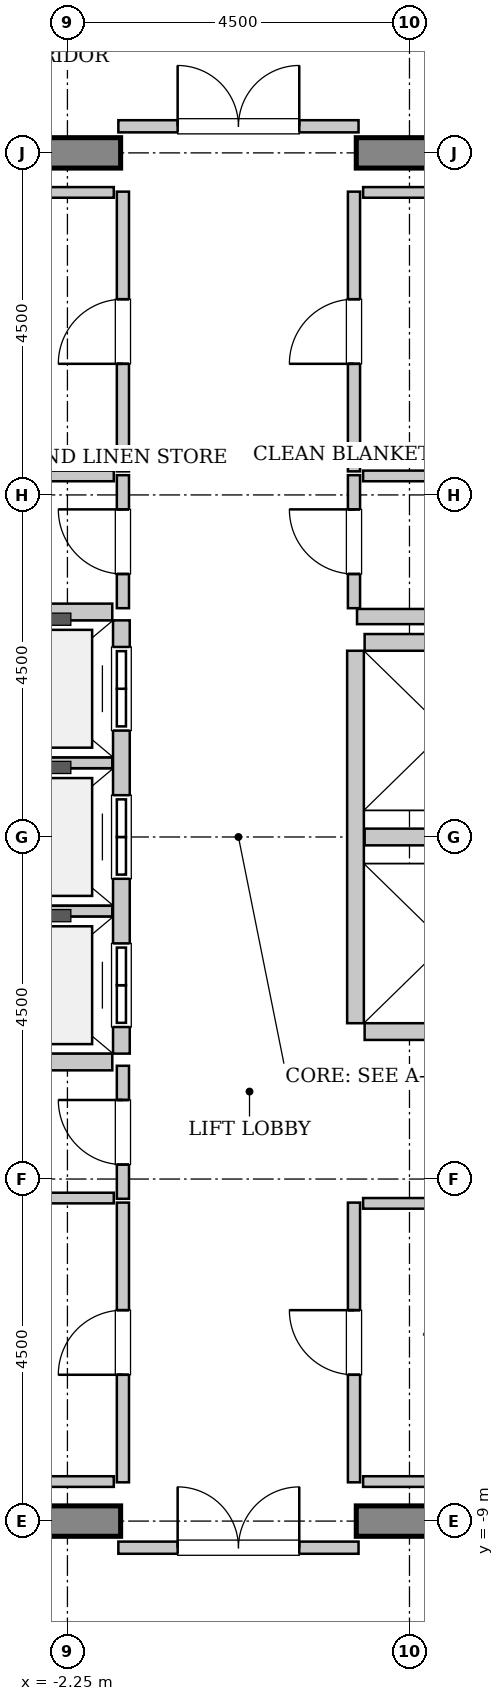
"""IFC4 building model, lengths in metres.
Left out: names, types, materials, properties, quantities, classifications, styles, units other than length and angle.
Written with IfcOpenShell. Run it as: python <this file> out.ifc"""

import sys

from ifc_helpers import new_model, si_unit, direction, frame, frame_2d, origin, place, context, subcontext, project, spatial, rectangle, extrude, source, transform, mapped, element, fill, save


model = new_model("IFC4")
c1 = context("Model", 3, precision=1e-05, world=origin(), true_north=direction((0.0, 1.0)))
c2 = subcontext(c1, "Body", "Model", "MODEL_VIEW")
j1 = project(units=[si_unit("LENGTHUNIT", "METRE"), si_unit("PLANEANGLEUNIT", "RADIAN")], contexts=[c1])
p1 = place(None, origin())
s1 = spatial("IfcSite", under=j1, at=p1, CompositionType="ELEMENT")
p2 = place(p1, origin())
s2 = spatial("IfcBuilding", under=s1, at=p2, CompositionType="ELEMENT")
p3 = place(p2, frame((0.0, 0.0, 345.2)))
s3 = spatial("IfcBuildingStorey", under=s2, at=p3, CompositionType="ELEMENT", Elevation=345.2)
m1 = source(origin(), c2, "Body", "SweptSolid", [
    extrude(rectangle(XDim=9.9, YDim=0.4, at=frame_2d((4.95, 0.0))), origin(), (0.0, 0.0, 1.0), 3.8),
])
for number, where, z_axis, x_axis in (
    (1, (-11.45, 9.0, 0.0), (0.0, 0.0, 1.0), (1.0, 0.0, 0.0)),
    (2, (1.55, 9.0, 0.0), (0.0, 0.0, 1.0), (1.0, 0.0, 0.0)),
    (3, (-11.45, -9.0, 0.0), (0.0, 0.0, 1.0), (1.0, 0.0, 0.0)),
    (4, (1.55, -9.0, 0.0), (0.0, 0.0, 1.0), (1.0, 0.0, 0.0)),
):
    element("IfcWall", number, at=place(p3, frame(where, z_axis=z_axis, x_axis=x_axis)), inside=s3, PredefinedType="SHEAR", context=c2, shape_type="MappedRepresentation", body=[
        mapped(m1, transform((0.0, 0.0, 0.0), x_axis=(1.0, 0.0, 0.0), y_axis=(0.0, 1.0, 0.0), z_axis=(0.0, 0.0, 1.0), scale=1.0)),
    ])
m2 = source(origin(), c2, "Body", "SweptSolid", [
    extrude(rectangle(XDim=5.7, YDim=0.22, at=frame_2d((2.85, 0.0))), origin(), (0.0, 0.0, 1.0), 3.485),
])
p4 = place(p3, frame((-1.54, -2.85, 0.0), z_axis=(0.0, 0.0, 1.0), x_axis=(0.0, 1.0, 0.0)))
e5 = element("IfcWall", 5, at=p4, inside=s3, PredefinedType="SOLIDWALL", context=c2, shape_type="MappedRepresentation", body=[
    mapped(m2, transform((0.0, 0.0, 0.0), x_axis=(1.0, 0.0, 0.0), y_axis=(0.0, 1.0, 0.0), z_axis=(0.0, 0.0, 1.0), scale=1.0)),
])
p5 = place(p4, frame((0.35, 0.0, 0.0)))
e6 = element("IfcOpeningElement", 6, at=p5, cuts=e5, PredefinedType="OPENING", context=c2, shape_type="SweptSolid", body=[
    extrude(rectangle(XDim=1.1, YDim=2.2, at=frame_2d((0.55, 1.1))), frame((0.0, 0.12, 0.0), z_axis=(0.0, -1.0, 0.0), x_axis=(1.0, 0.0, 0.0)), (0.0, 0.0, 1.0), 0.24),
])
p6 = place(p4, frame((2.3, 0.0, 0.0)))
e7 = element("IfcOpeningElement", 7, at=p6, cuts=e5, PredefinedType="OPENING", context=c2, shape_type="SweptSolid", body=[
    extrude(rectangle(XDim=1.1, YDim=2.2, at=frame_2d((0.55, 1.1))), frame((0.0, 0.12, 0.0), z_axis=(0.0, -1.0, 0.0), x_axis=(1.0, 0.0, 0.0)), (0.0, 0.0, 1.0), 0.24),
])
p7 = place(p4, frame((4.25, 0.0, 0.0)))
e8 = element("IfcOpeningElement", 8, at=p7, cuts=e5, PredefinedType="OPENING", context=c2, shape_type="SweptSolid", body=[
    extrude(rectangle(XDim=1.1, YDim=2.2, at=frame_2d((0.55, 1.1))), frame((0.0, 0.12, 0.0), z_axis=(0.0, -1.0, 0.0), x_axis=(1.0, 0.0, 0.0)), (0.0, 0.0, 1.0), 0.24),
])
m3 = source(origin(), c2, "Body", "SweptSolid", [
    extrude(rectangle(XDim=2.13, YDim=0.22, at=frame_2d((1.065, 0.0))), origin(), (0.0, 0.0, 1.0), 3.485),
])
p8 = place(p3, frame((-3.79, -2.96, 0.0), z_axis=(0.0, 0.0, 1.0), x_axis=(1.0, 0.0, 0.0)))
e9 = element("IfcWall", 9, at=p8, inside=s3, PredefinedType="SOLIDWALL", context=c2, shape_type="MappedRepresentation", body=[
    mapped(m3, transform((0.0, 0.0, 0.0), x_axis=(1.0, 0.0, 0.0), y_axis=(0.0, 1.0, 0.0), z_axis=(0.0, 0.0, 1.0), scale=1.0)),
])
m4 = source(origin(), c2, "Body", "SweptSolid", [
    extrude(rectangle(XDim=2.13, YDim=0.14, at=frame_2d((1.065, 0.0))), origin(), (0.0, 0.0, 1.0), 3.485),
])
for number, where, z_axis, x_axis in (
    (10, (-3.79, -0.975, 0.0), (0.0, 0.0, 1.0), (1.0, 0.0, 0.0)),
    (11, (-3.79, 0.975, 0.0), (0.0, 0.0, 1.0), (1.0, 0.0, 0.0)),
):
    element("IfcWall", number, at=place(p3, frame(where, z_axis=z_axis, x_axis=x_axis)), inside=s3, PredefinedType="PARTITIONING", context=c2, shape_type="MappedRepresentation", body=[
        mapped(m4, transform((0.0, 0.0, 0.0), x_axis=(1.0, 0.0, 0.0), y_axis=(0.0, 1.0, 0.0), z_axis=(0.0, 0.0, 1.0), scale=1.0)),
    ])
p9 = place(p3, frame((-1.66, 2.96, 0.0), z_axis=(0.0, 0.0, 1.0), x_axis=(-1.0, 0.0, 0.0)))
e12 = element("IfcWall", 12, at=p9, inside=s3, PredefinedType="SOLIDWALL", context=c2, shape_type="MappedRepresentation", body=[
    mapped(m3, transform((0.0, 0.0, 0.0), x_axis=(1.0, 0.0, 0.0), y_axis=(0.0, 1.0, 0.0), z_axis=(0.0, 0.0, 1.0), scale=1.0)),
])
m5 = source(origin(), c2, "Body", "SweptSolid", [
    extrude(rectangle(XDim=4.9, YDim=0.22, at=frame_2d((2.45, 0.0))), origin(), (0.0, 0.0, 1.0), 3.485),
])
p10 = place(p3, frame((1.54, 2.45, 0.0), z_axis=(0.0, 0.0, 1.0), x_axis=(0.0, -1.0, 0.0)))
e13 = element("IfcWall", 13, at=p10, inside=s3, PredefinedType="SOLIDWALL", context=c2, shape_type="MappedRepresentation", body=[
    mapped(m5, transform((0.0, 0.0, 0.0), x_axis=(1.0, 0.0, 0.0), y_axis=(0.0, 1.0, 0.0), z_axis=(0.0, 0.0, 1.0), scale=1.0)),
])
for number, where, z_axis, x_axis in (
    (14, (1.66, -2.56, 0.0), (0.0, 0.0, 1.0), (1.0, 0.0, 0.0)),
    (15, (1.66, 0.0, 0.0), (0.0, 0.0, 1.0), (1.0, 0.0, 0.0)),
    (16, (3.79, 2.56, 0.0), (0.0, 0.0, 1.0), (-1.0, 0.0, 0.0)),
):
    element("IfcWall", number, at=place(p3, frame(where, z_axis=z_axis, x_axis=x_axis)), inside=s3, PredefinedType="SOLIDWALL", context=c2, shape_type="MappedRepresentation", body=[
        mapped(m3, transform((0.0, 0.0, 0.0), x_axis=(1.0, 0.0, 0.0), y_axis=(0.0, 1.0, 0.0), z_axis=(0.0, 0.0, 1.0), scale=1.0)),
    ])
m6 = source(origin(), c2, "Body", "SweptSolid", [
    extrude(rectangle(XDim=2.52, YDim=0.2, at=frame_2d((1.26, 0.0))), origin(), (0.0, 0.0, 1.0), 3.485),
])
p11 = place(p3, frame((1.56, 2.9, 0.0), z_axis=(0.0, 0.0, 1.0), x_axis=(1.0, 0.0, 0.0)))
e17 = element("IfcWall", 17, at=p11, inside=s3, PredefinedType="PARTITIONING", context=c2, shape_type="MappedRepresentation", body=[
    mapped(m6, transform((0.0, 0.0, 0.0), x_axis=(1.0, 0.0, 0.0), y_axis=(0.0, 1.0, 0.0), z_axis=(0.0, 0.0, 1.0), scale=1.0)),
])
m7 = source(origin(), c2, "Body", "SweptSolid", [
    extrude(rectangle(XDim=3.16, YDim=0.16, at=frame_2d((1.58, 0.0))), origin(), (0.0, 0.0, 1.0), 2.575),
])
p12 = place(p3, frame((-1.58, 9.35, 0.0), z_axis=(0.0, 0.0, 1.0), x_axis=(1.0, 0.0, 0.0)))
e18 = element("IfcWall", 18, at=p12, inside=s3, PredefinedType="PARTITIONING", context=c2, shape_type="MappedRepresentation", body=[
    mapped(m7, transform((0.0, 0.0, 0.0), x_axis=(1.0, 0.0, 0.0), y_axis=(0.0, 1.0, 0.0), z_axis=(0.0, 0.0, 1.0), scale=1.0)),
])
p13 = place(p12, frame((0.78, 0.0, 0.0)))
e19 = element("IfcOpeningElement", 19, at=p13, cuts=e18, PredefinedType="OPENING", context=c2, shape_type="SweptSolid", body=[
    extrude(rectangle(XDim=1.6, YDim=2.3, at=frame_2d((0.8, 1.15))), frame((0.0, 0.09, 0.0), z_axis=(0.0, -1.0, 0.0), x_axis=(1.0, 0.0, 0.0)), (0.0, 0.0, 1.0), 0.18),
])
p14 = place(p3, frame((-1.58, -9.35, 0.0), z_axis=(0.0, 0.0, 1.0), x_axis=(1.0, 0.0, 0.0)))
e20 = element("IfcWall", 20, at=p14, inside=s3, PredefinedType="PARTITIONING", context=c2, shape_type="MappedRepresentation", body=[
    mapped(m7, transform((0.0, 0.0, 0.0), x_axis=(1.0, 0.0, 0.0), y_axis=(0.0, 1.0, 0.0), z_axis=(0.0, 0.0, 1.0), scale=1.0)),
])
p15 = place(p14, frame((0.78, 0.0, 0.0)))
e21 = element("IfcOpeningElement", 21, at=p15, cuts=e20, PredefinedType="OPENING", context=c2, shape_type="SweptSolid", body=[
    extrude(rectangle(XDim=1.6, YDim=2.3, at=frame_2d((0.8, 1.15))), frame((0.0, 0.09, 0.0), z_axis=(0.0, -1.0, 0.0), x_axis=(1.0, 0.0, 0.0)), (0.0, 0.0, 1.0), 0.18),
])
m8 = source(origin(), c2, "Body", "SweptSolid", [
    extrude(rectangle(XDim=1.75, YDim=0.16, at=frame_2d((0.875, 0.0))), origin(), (0.0, 0.0, 1.0), 3.485),
])
p16 = place(p3, frame((-1.52, 3.01, 0.0), z_axis=(0.0, 0.0, 1.0), x_axis=(0.0, 1.0, 0.0)))
e22 = element("IfcWall", 22, at=p16, inside=s3, PredefinedType="PARTITIONING", context=c2, shape_type="MappedRepresentation", body=[
    mapped(m8, transform((0.0, 0.0, 0.0), x_axis=(1.0, 0.0, 0.0), y_axis=(0.0, 1.0, 0.0), z_axis=(0.0, 0.0, 1.0), scale=1.0)),
])
p17 = place(p16, frame((0.45, 0.0, 0.0)))
e23 = element("IfcOpeningElement", 23, at=p17, cuts=e22, PredefinedType="OPENING", context=c2, shape_type="SweptSolid", body=[
    extrude(rectangle(XDim=0.85, YDim=2.1, at=frame_2d((0.425, 1.05))), frame((0.0, 0.09, 0.0), z_axis=(0.0, -1.0, 0.0), x_axis=(1.0, 0.0, 0.0)), (0.0, 0.0, 1.0), 0.18),
])
m9 = source(origin(), c2, "Body", "SweptSolid", [
    extrude(rectangle(XDim=2.95, YDim=0.14, at=frame_2d((1.475, 0.0))), origin(), (0.0, 0.0, 1.0), 3.485),
])
p18 = place(p3, frame((-4.59, 4.75, 0.0), z_axis=(0.0, 0.0, 1.0), x_axis=(1.0, 0.0, 0.0)))
e24 = element("IfcWall", 24, at=p18, inside=s3, PredefinedType="PARTITIONING", context=c2, shape_type="MappedRepresentation", body=[
    mapped(m9, transform((0.0, 0.0, 0.0), x_axis=(1.0, 0.0, 0.0), y_axis=(0.0, 1.0, 0.0), z_axis=(0.0, 0.0, 1.0), scale=1.0)),
])
m10 = source(origin(), c2, "Body", "SweptSolid", [
    extrude(rectangle(XDim=3.68, YDim=0.16, at=frame_2d((1.84, 0.0))), origin(), (0.0, 0.0, 1.0), 3.485),
])
p19 = place(p3, frame((-1.52, 4.81, 0.0), z_axis=(0.0, 0.0, 1.0), x_axis=(0.0, 1.0, 0.0)))
e25 = element("IfcWall", 25, at=p19, inside=s3, PredefinedType="PARTITIONING", context=c2, shape_type="MappedRepresentation", body=[
    mapped(m10, transform((0.0, 0.0, 0.0), x_axis=(1.0, 0.0, 0.0), y_axis=(0.0, 1.0, 0.0), z_axis=(0.0, 0.0, 1.0), scale=1.0)),
])
p20 = place(p19, frame((1.415, 0.0, 0.0)))
e26 = element("IfcOpeningElement", 26, at=p20, cuts=e25, PredefinedType="OPENING", context=c2, shape_type="SweptSolid", body=[
    extrude(rectangle(XDim=0.85, YDim=2.1, at=frame_2d((0.425, 1.05))), frame((0.0, 0.09, 0.0), z_axis=(0.0, -1.0, 0.0), x_axis=(1.0, 0.0, 0.0)), (0.0, 0.0, 1.0), 0.18),
])
m11 = source(origin(), c2, "Body", "SweptSolid", [
    extrude(rectangle(XDim=3.15, YDim=0.14, at=frame_2d((1.575, 0.0))), origin(), (0.0, 0.0, 1.0), 3.485),
])
p21 = place(p3, frame((-4.79, 8.48, 0.0), z_axis=(0.0, 0.0, 1.0), x_axis=(1.0, 0.0, 0.0)))
e27 = element("IfcWall", 27, at=p21, inside=s3, PredefinedType="PARTITIONING", context=c2, shape_type="MappedRepresentation", body=[
    mapped(m11, transform((0.0, 0.0, 0.0), x_axis=(1.0, 0.0, 0.0), y_axis=(0.0, 1.0, 0.0), z_axis=(0.0, 0.0, 1.0), scale=1.0)),
])
p22 = place(p3, frame((1.52, 3.01, 0.0), z_axis=(0.0, 0.0, 1.0), x_axis=(0.0, 1.0, 0.0)))
e28 = element("IfcWall", 28, at=p22, inside=s3, PredefinedType="PARTITIONING", context=c2, shape_type="MappedRepresentation", body=[
    mapped(m8, transform((0.0, 0.0, 0.0), x_axis=(1.0, 0.0, 0.0), y_axis=(0.0, 1.0, 0.0), z_axis=(0.0, 0.0, 1.0), scale=1.0)),
])
p23 = place(p22, frame((0.45, 0.0, 0.0)))
e29 = element("IfcOpeningElement", 29, at=p23, cuts=e28, PredefinedType="OPENING", context=c2, shape_type="SweptSolid", body=[
    extrude(rectangle(XDim=0.85, YDim=2.1, at=frame_2d((0.425, 1.05))), frame((0.0, 0.09, 0.0), z_axis=(0.0, -1.0, 0.0), x_axis=(1.0, 0.0, 0.0)), (0.0, 0.0, 1.0), 0.18),
])
p24 = place(p3, frame((1.64, 4.75, 0.0), z_axis=(0.0, 0.0, 1.0), x_axis=(1.0, 0.0, 0.0)))
e30 = element("IfcWall", 30, at=p24, inside=s3, PredefinedType="PARTITIONING", context=c2, shape_type="MappedRepresentation", body=[
    mapped(m11, transform((0.0, 0.0, 0.0), x_axis=(1.0, 0.0, 0.0), y_axis=(0.0, 1.0, 0.0), z_axis=(0.0, 0.0, 1.0), scale=1.0)),
])
p25 = place(p3, frame((1.52, 4.81, 0.0), z_axis=(0.0, 0.0, 1.0), x_axis=(0.0, 1.0, 0.0)))
e31 = element("IfcWall", 31, at=p25, inside=s3, PredefinedType="PARTITIONING", context=c2, shape_type="MappedRepresentation", body=[
    mapped(m10, transform((0.0, 0.0, 0.0), x_axis=(1.0, 0.0, 0.0), y_axis=(0.0, 1.0, 0.0), z_axis=(0.0, 0.0, 1.0), scale=1.0)),
])
p26 = place(p25, frame((1.415, 0.0, 0.0)))
e32 = element("IfcOpeningElement", 32, at=p26, cuts=e31, PredefinedType="OPENING", context=c2, shape_type="SweptSolid", body=[
    extrude(rectangle(XDim=0.85, YDim=2.1, at=frame_2d((0.425, 1.05))), frame((0.0, 0.09, 0.0), z_axis=(0.0, -1.0, 0.0), x_axis=(1.0, 0.0, 0.0)), (0.0, 0.0, 1.0), 0.18),
])
p27 = place(p3, frame((1.64, 8.48, 0.0), z_axis=(0.0, 0.0, 1.0), x_axis=(1.0, 0.0, 0.0)))
e33 = element("IfcWall", 33, at=p27, inside=s3, PredefinedType="PARTITIONING", context=c2, shape_type="MappedRepresentation", body=[
    mapped(m11, transform((0.0, 0.0, 0.0), x_axis=(1.0, 0.0, 0.0), y_axis=(0.0, 1.0, 0.0), z_axis=(0.0, 0.0, 1.0), scale=1.0)),
])
p28 = place(p3, frame((-1.52, -4.76, 0.0), z_axis=(0.0, 0.0, 1.0), x_axis=(0.0, 1.0, 0.0)))
e34 = element("IfcWall", 34, at=p28, inside=s3, PredefinedType="PARTITIONING", context=c2, shape_type="MappedRepresentation", body=[
    mapped(m8, transform((0.0, 0.0, 0.0), x_axis=(1.0, 0.0, 0.0), y_axis=(0.0, 1.0, 0.0), z_axis=(0.0, 0.0, 1.0), scale=1.0)),
])
p29 = place(p28, frame((0.45, 0.0, 0.0)))
e35 = element("IfcOpeningElement", 35, at=p29, cuts=e34, PredefinedType="OPENING", context=c2, shape_type="SweptSolid", body=[
    extrude(rectangle(XDim=0.85, YDim=2.1, at=frame_2d((0.425, 1.05))), frame((0.0, 0.09, 0.0), z_axis=(0.0, -1.0, 0.0), x_axis=(1.0, 0.0, 0.0)), (0.0, 0.0, 1.0), 0.18),
])
p30 = place(p3, frame((-4.79, -4.75, 0.0), z_axis=(0.0, 0.0, 1.0), x_axis=(1.0, 0.0, 0.0)))
e36 = element("IfcWall", 36, at=p30, inside=s3, PredefinedType="PARTITIONING", context=c2, shape_type="MappedRepresentation", body=[
    mapped(m11, transform((0.0, 0.0, 0.0), x_axis=(1.0, 0.0, 0.0), y_axis=(0.0, 1.0, 0.0), z_axis=(0.0, 0.0, 1.0), scale=1.0)),
])
p31 = place(p3, frame((-1.52, -8.49, 0.0), z_axis=(0.0, 0.0, 1.0), x_axis=(0.0, 1.0, 0.0)))
e37 = element("IfcWall", 37, at=p31, inside=s3, PredefinedType="PARTITIONING", context=c2, shape_type="MappedRepresentation", body=[
    mapped(m10, transform((0.0, 0.0, 0.0), x_axis=(1.0, 0.0, 0.0), y_axis=(0.0, 1.0, 0.0), z_axis=(0.0, 0.0, 1.0), scale=1.0)),
])
p32 = place(p31, frame((1.415, 0.0, 0.0)))
e38 = element("IfcOpeningElement", 38, at=p32, cuts=e37, PredefinedType="OPENING", context=c2, shape_type="SweptSolid", body=[
    extrude(rectangle(XDim=0.85, YDim=2.1, at=frame_2d((0.425, 1.05))), frame((0.0, 0.09, 0.0), z_axis=(0.0, -1.0, 0.0), x_axis=(1.0, 0.0, 0.0)), (0.0, 0.0, 1.0), 0.18),
])
m12 = source(origin(), c2, "Body", "SweptSolid", [
    extrude(rectangle(XDim=3.03, YDim=0.14, at=frame_2d((1.515, 0.0))), origin(), (0.0, 0.0, 1.0), 3.485),
])
p33 = place(p3, frame((-4.67, -8.48, 0.0), z_axis=(0.0, 0.0, 1.0), x_axis=(1.0, 0.0, 0.0)))
e39 = element("IfcWall", 39, at=p33, inside=s3, PredefinedType="PARTITIONING", context=c2, shape_type="MappedRepresentation", body=[
    mapped(m12, transform((0.0, 0.0, 0.0), x_axis=(1.0, 0.0, 0.0), y_axis=(0.0, 1.0, 0.0), z_axis=(0.0, 0.0, 1.0), scale=1.0)),
])
p34 = place(p3, frame((1.52, -8.49, 0.0), z_axis=(0.0, 0.0, 1.0), x_axis=(0.0, 1.0, 0.0)))
e40 = element("IfcWall", 40, at=p34, inside=s3, PredefinedType="PARTITIONING", context=c2, shape_type="MappedRepresentation", body=[
    mapped(m10, transform((0.0, 0.0, 0.0), x_axis=(1.0, 0.0, 0.0), y_axis=(0.0, 1.0, 0.0), z_axis=(0.0, 0.0, 1.0), scale=1.0)),
])
p35 = place(p34, frame((1.415, 0.0, 0.0)))
e41 = element("IfcOpeningElement", 41, at=p35, cuts=e40, PredefinedType="OPENING", context=c2, shape_type="SweptSolid", body=[
    extrude(rectangle(XDim=0.85, YDim=2.1, at=frame_2d((0.425, 1.05))), frame((0.0, 0.09, 0.0), z_axis=(0.0, -1.0, 0.0), x_axis=(1.0, 0.0, 0.0)), (0.0, 0.0, 1.0), 0.18),
])
p36 = place(p3, frame((1.64, -4.82, 0.0), z_axis=(0.0, 0.0, 1.0), x_axis=(1.0, 0.0, 0.0)))
e42 = element("IfcWall", 42, at=p36, inside=s3, PredefinedType="PARTITIONING", context=c2, shape_type="MappedRepresentation", body=[
    mapped(m9, transform((0.0, 0.0, 0.0), x_axis=(1.0, 0.0, 0.0), y_axis=(0.0, 1.0, 0.0), z_axis=(0.0, 0.0, 1.0), scale=1.0)),
])
p37 = place(p3, frame((1.64, -8.48, 0.0), z_axis=(0.0, 0.0, 1.0), x_axis=(1.0, 0.0, 0.0)))
e43 = element("IfcWall", 43, at=p37, inside=s3, PredefinedType="PARTITIONING", context=c2, shape_type="MappedRepresentation", body=[
    mapped(m11, transform((0.0, 0.0, 0.0), x_axis=(1.0, 0.0, 0.0), y_axis=(0.0, 1.0, 0.0), z_axis=(0.0, 0.0, 1.0), scale=1.0)),
])
m13 = source(origin(), c2, "Body", "SweptSolid", [
    extrude(rectangle(XDim=1.1, YDim=2.2, at=frame_2d((0.55, 1.1))), frame((0.0, 0.025, 0.0), z_axis=(0.0, -1.0, 0.0), x_axis=(1.0, 0.0, 0.0)), (0.0, 0.0, 1.0), 0.05),
])
p38 = place(p5, origin())
e44 = element("IfcDoor", 44, at=p38, inside=s3, OperationType="DOUBLE_DOOR_SLIDING", PredefinedType="DOOR", context=c2, shape_type="MappedRepresentation", body=[
    mapped(m13, transform((0.0, 0.0, 0.0), x_axis=(1.0, 0.0, 0.0), y_axis=(0.0, 1.0, 0.0), z_axis=(0.0, 0.0, 1.0), scale=1.0)),
])
fill(e6, e44)
p39 = place(p6, origin())
e45 = element("IfcDoor", 45, at=p39, inside=s3, OperationType="DOUBLE_DOOR_SLIDING", PredefinedType="DOOR", context=c2, shape_type="MappedRepresentation", body=[
    mapped(m13, transform((0.0, 0.0, 0.0), x_axis=(1.0, 0.0, 0.0), y_axis=(0.0, 1.0, 0.0), z_axis=(0.0, 0.0, 1.0), scale=1.0)),
])
fill(e7, e45)
p40 = place(p7, origin())
e46 = element("IfcDoor", 46, at=p40, inside=s3, OperationType="DOUBLE_DOOR_SLIDING", PredefinedType="DOOR", context=c2, shape_type="MappedRepresentation", body=[
    mapped(m13, transform((0.0, 0.0, 0.0), x_axis=(1.0, 0.0, 0.0), y_axis=(0.0, 1.0, 0.0), z_axis=(0.0, 0.0, 1.0), scale=1.0)),
])
fill(e8, e46)
m14 = source(origin(), c2, "Body", "SweptSolid", [
    extrude(rectangle(XDim=1.6, YDim=2.3, at=frame_2d((0.8, 1.15))), frame((0.0, 0.025, 0.0), z_axis=(0.0, -1.0, 0.0), x_axis=(1.0, 0.0, 0.0)), (0.0, 0.0, 1.0), 0.05),
])
p41 = place(p13, origin())
e47 = element("IfcDoor", 47, at=p41, inside=s3, OperationType="DOUBLE_DOOR_SINGLE_SWING", PredefinedType="DOOR", context=c2, shape_type="MappedRepresentation", body=[
    mapped(m14, transform((0.0, 0.0, 0.0), x_axis=(1.0, 0.0, 0.0), y_axis=(0.0, 1.0, 0.0), z_axis=(0.0, 0.0, 1.0), scale=1.0)),
])
fill(e19, e47)
p42 = place(p15, origin())
e48 = element("IfcDoor", 48, at=p42, inside=s3, OperationType="DOUBLE_DOOR_SINGLE_SWING", PredefinedType="DOOR", context=c2, shape_type="MappedRepresentation", body=[
    mapped(m14, transform((0.0, 0.0, 0.0), x_axis=(1.0, 0.0, 0.0), y_axis=(0.0, 1.0, 0.0), z_axis=(0.0, 0.0, 1.0), scale=1.0)),
])
fill(e21, e48)
m15 = source(origin(), c2, "Body", "SweptSolid", [
    extrude(rectangle(XDim=0.85, YDim=2.1, at=frame_2d((0.425, 1.05))), frame((0.0, 0.025, 0.0), z_axis=(0.0, -1.0, 0.0), x_axis=(1.0, 0.0, 0.0)), (0.0, 0.0, 1.0), 0.05),
])
p43 = place(p17, origin())
e49 = element("IfcDoor", 49, at=p43, inside=s3, OperationType="SINGLE_SWING_RIGHT", PredefinedType="DOOR", context=c2, shape_type="MappedRepresentation", body=[
    mapped(m15, transform((0.0, 0.0, 0.0), x_axis=(1.0, 0.0, 0.0), y_axis=(0.0, 1.0, 0.0), z_axis=(0.0, 0.0, 1.0), scale=1.0)),
])
fill(e23, e49)
p44 = place(p20, origin())
e50 = element("IfcDoor", 50, at=p44, inside=s3, OperationType="SINGLE_SWING_LEFT", PredefinedType="DOOR", context=c2, shape_type="MappedRepresentation", body=[
    mapped(m15, transform((0.0, 0.0, 0.0), x_axis=(1.0, 0.0, 0.0), y_axis=(0.0, 1.0, 0.0), z_axis=(0.0, 0.0, 1.0), scale=1.0)),
])
fill(e26, e50)
p45 = place(p23, origin())
e51 = element("IfcDoor", 51, at=p45, inside=s3, OperationType="SINGLE_SWING_RIGHT", PredefinedType="DOOR", context=c2, shape_type="MappedRepresentation", body=[
    mapped(m15, transform((0.0, 0.0, 0.0), x_axis=(1.0, 0.0, 0.0), y_axis=(0.0, 1.0, 0.0), z_axis=(0.0, 0.0, 1.0), scale=1.0)),
])
fill(e29, e51)
p46 = place(p26, origin())
e52 = element("IfcDoor", 52, at=p46, inside=s3, OperationType="SINGLE_SWING_LEFT", PredefinedType="DOOR", context=c2, shape_type="MappedRepresentation", body=[
    mapped(m15, transform((0.0, 0.0, 0.0), x_axis=(1.0, 0.0, 0.0), y_axis=(0.0, 1.0, 0.0), z_axis=(0.0, 0.0, 1.0), scale=1.0)),
])
fill(e32, e52)
p47 = place(p29, origin())
e53 = element("IfcDoor", 53, at=p47, inside=s3, OperationType="SINGLE_SWING_RIGHT", PredefinedType="DOOR", context=c2, shape_type="MappedRepresentation", body=[
    mapped(m15, transform((0.0, 0.0, 0.0), x_axis=(1.0, 0.0, 0.0), y_axis=(0.0, 1.0, 0.0), z_axis=(0.0, 0.0, 1.0), scale=1.0)),
])
fill(e35, e53)
p48 = place(p32, origin())
e54 = element("IfcDoor", 54, at=p48, inside=s3, OperationType="SINGLE_SWING_LEFT", PredefinedType="DOOR", context=c2, shape_type="MappedRepresentation", body=[
    mapped(m15, transform((0.0, 0.0, 0.0), x_axis=(1.0, 0.0, 0.0), y_axis=(0.0, 1.0, 0.0), z_axis=(0.0, 0.0, 1.0), scale=1.0)),
])
fill(e38, e54)
p49 = place(p35, origin())
e55 = element("IfcDoor", 55, at=p49, inside=s3, OperationType="SINGLE_SWING_RIGHT", PredefinedType="DOOR", context=c2, shape_type="MappedRepresentation", body=[
    mapped(m15, transform((0.0, 0.0, 0.0), x_axis=(1.0, 0.0, 0.0), y_axis=(0.0, 1.0, 0.0), z_axis=(0.0, 0.0, 1.0), scale=1.0)),
])
fill(e41, e55)
save(model, sys.argv[1])
